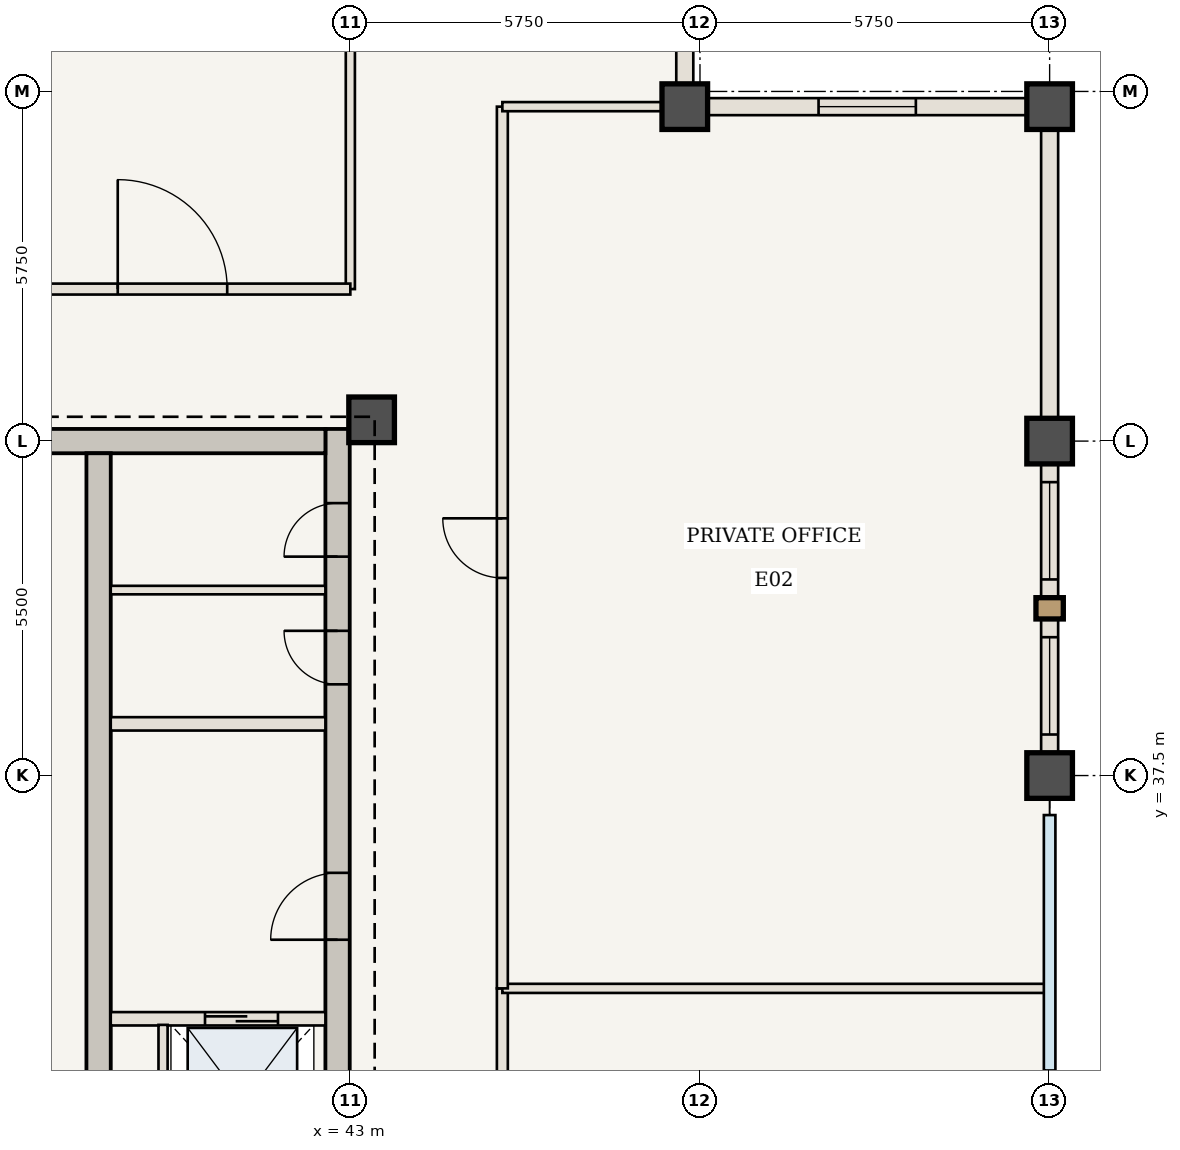
"""IFC4 building model, lengths in metres.
Left out: names, types, materials, properties, quantities, classifications, styles, units other than length and angle.
Written with IfcOpenShell. Run it as: python <this file> out.ifc"""

import sys

from ifc_helpers import new_model, si_unit, direction, frame, frame_2d, origin, origin_2d, place, context, subcontext, project, spatial, rectangle, extrude, element, fill, save


model = new_model("IFC4")
c1 = context("Model", 3, precision=1e-05, world=origin(), true_north=direction((0.0, 1.0)))
c2 = subcontext(c1, "Body", "Model", "MODEL_VIEW")
j1 = project(units=[si_unit("LENGTHUNIT", "METRE"), si_unit("PLANEANGLEUNIT", "RADIAN")], contexts=[c1])
p1 = place(None, origin())
s1 = spatial("IfcSite", under=j1, at=p1, CompositionType="ELEMENT")
p2 = place(p1, origin())
s2 = spatial("IfcBuilding", under=s1, at=p2, CompositionType="ELEMENT")
p3 = place(p2, frame((0.0, 0.0, 308.35)))
s3 = spatial("IfcBuildingStorey", under=s2, at=p3, CompositionType="ELEMENT", Elevation=308.35)
p4 = place(p3, frame((42.79, 30.6, 0.0), z_axis=(0.0, 0.0, 1.0), x_axis=(0.0, 1.0, 0.0)))
e1 = element("IfcWall", 1, at=p4, inside=s3, PredefinedType="SHEAR", context=c2, shape_type="SweptSolid", body=[
    extrude(rectangle(XDim=12.6, YDim=0.4, at=frame_2d((6.3, 0.0))), origin(), (0.0, 0.0, 1.0), 4.9),
])
p5 = place(p4, frame((4.2, 0.0, 0.0)))
e2 = element("IfcOpeningElement", 2, at=p5, cuts=e1, PredefinedType="OPENING", context=c2, shape_type="SweptSolid", body=[
    extrude(rectangle(XDim=1.1, YDim=2.15, at=frame_2d((0.55, 1.075))), frame((0.0, 0.21, 0.0), z_axis=(0.0, -1.0, 0.0), x_axis=(1.0, 0.0, 0.0)), (0.0, 0.0, 1.0), 0.42),
])
p6 = place(p4, frame((8.4, 0.0, 0.0)))
e3 = element("IfcOpeningElement", 3, at=p6, cuts=e1, PredefinedType="OPENING", context=c2, shape_type="SweptSolid", body=[
    extrude(rectangle(XDim=0.88, YDim=2.1, at=frame_2d((0.44, 1.05))), frame((0.0, 0.21, 0.0), z_axis=(0.0, -1.0, 0.0), x_axis=(1.0, 0.0, 0.0)), (0.0, 0.0, 1.0), 0.42),
])
p7 = place(p4, frame((10.5, 0.0, 0.0)))
e4 = element("IfcOpeningElement", 4, at=p7, cuts=e1, PredefinedType="OPENING", context=c2, shape_type="SweptSolid", body=[
    extrude(rectangle(XDim=0.88, YDim=2.1, at=frame_2d((0.44, 1.05))), frame((0.0, 0.21, 0.0), z_axis=(0.0, -1.0, 0.0), x_axis=(1.0, 0.0, 0.0)), (0.0, 0.0, 1.0), 0.42),
])
p8 = place(p3, frame((37.75, 43.0, 0.0), z_axis=(0.0, 0.0, 1.0), x_axis=(1.0, 0.0, 0.0)))
e5 = element("IfcWall", 5, at=p8, inside=s3, PredefinedType="SHEAR", context=c2, shape_type="SweptSolid", body=[
    extrude(rectangle(XDim=4.84, YDim=0.4, at=frame_2d((2.42, 0.0))), origin(), (0.0, 0.0, 1.0), 4.9),
])
p9 = place(p3, frame((38.86, 30.6, 0.0), z_axis=(0.0, 0.0, 1.0), x_axis=(0.0, 1.0, 0.0)))
e6 = element("IfcWall", 6, at=p9, inside=s3, PredefinedType="SHEAR", context=c2, shape_type="SweptSolid", body=[
    extrude(rectangle(XDim=12.2, YDim=0.4, at=frame_2d((6.1, 0.0))), origin(), (0.0, 0.0, 1.0), 4.9),
])
for number, where, z_axis, x_axis in (
    (7, (43.35, 43.35, 0.0), (0.0, 0.0, 1.0), (1.0, 0.0, 0.0)),
    (8, (54.5, 48.5, 0.0), (0.0, 0.0, 1.0), (1.0, 0.0, 0.0)),
    (9, (48.5, 48.5, 0.0), (0.0, 0.0, 1.0), (1.0, 0.0, 0.0)),
    (10, (54.5, 37.5, 0.0), (0.0, 0.0, 1.0), (1.0, 0.0, 0.0)),
    (11, (54.5, 43.0, 0.0), (0.0, 0.0, 1.0), (1.0, 0.0, 0.0)),
):
    element("IfcColumn", number, at=place(p3, frame(where, z_axis=z_axis, x_axis=x_axis)), inside=s3, PredefinedType="COLUMN", context=c2, shape_type="SweptSolid", body=[
        extrude(rectangle(XDim=0.75, YDim=0.75, at=origin_2d()), origin(), (0.0, 0.0, 1.0), 4.9),
    ])
p10 = place(p3, frame((39.06, 33.5, 0.0), z_axis=(0.0, 0.0, 1.0), x_axis=(1.0, 0.0, 0.0)))
e12 = element("IfcWall", 12, at=p10, inside=s3, PredefinedType="STANDARD", context=c2, shape_type="SweptSolid", body=[
    extrude(rectangle(XDim=3.53, YDim=0.22, at=frame_2d((1.765, 0.0))), origin(), (0.0, 0.0, 1.0), 4.64),
])
p11 = place(p10, frame((1.55, 0.0, 0.0)))
e13 = element("IfcOpeningElement", 13, at=p11, cuts=e12, PredefinedType="OPENING", context=c2, shape_type="SweptSolid", body=[
    extrude(rectangle(XDim=1.2, YDim=2.2, at=frame_2d((0.6, 1.1))), frame((0.0, 0.12, 0.0), z_axis=(0.0, -1.0, 0.0), x_axis=(1.0, 0.0, 0.0)), (0.0, 0.0, 1.0), 0.24),
])
p12 = place(p3, frame((39.92, 30.75, 0.0), z_axis=(0.0, 0.0, 1.0), x_axis=(0.0, 1.0, 0.0)))
e14 = element("IfcWall", 14, at=p12, inside=s3, PredefinedType="STANDARD", context=c2, shape_type="SweptSolid", body=[
    extrude(rectangle(XDim=2.65, YDim=0.15, at=frame_2d((1.325, 0.0))), origin(), (0.0, 0.0, 1.0), 4.64),
])
p13 = place(p3, frame((39.06, 38.35, 0.0), z_axis=(0.0, 0.0, 1.0), x_axis=(1.0, 0.0, 0.0)))
e15 = element("IfcWall", 15, at=p13, inside=s3, PredefinedType="STANDARD", context=c2, shape_type="SweptSolid", body=[
    extrude(rectangle(XDim=3.53, YDim=0.22, at=frame_2d((1.765, 0.0))), origin(), (0.0, 0.0, 1.0), 4.64),
])
p14 = place(p3, frame((39.06, 40.55, 0.0), z_axis=(0.0, 0.0, 1.0), x_axis=(1.0, 0.0, 0.0)))
e16 = element("IfcWall", 16, at=p14, inside=s3, PredefinedType="STANDARD", context=c2, shape_type="SweptSolid", body=[
    extrude(rectangle(XDim=3.53, YDim=0.14, at=frame_2d((1.765, 0.0))), origin(), (0.0, 0.0, 1.0), 4.64),
])
p15 = place(p3, frame((43.0, 45.5, 0.0), z_axis=(0.0, 0.0, 1.0), x_axis=(0.0, 1.0, 0.0)))
e17 = element("IfcWall", 17, at=p15, inside=s3, PredefinedType="STANDARD", context=c2, shape_type="SweptSolid", body=[
    extrude(rectangle(XDim=8.94, YDim=0.15, at=frame_2d((4.47, 0.0))), origin(), (0.0, 0.0, 1.0), 4.64),
])
p16 = place(p3, frame((36.4, 45.5, 0.0), z_axis=(0.0, 0.0, 1.0), x_axis=(1.0, 0.0, 0.0)))
e18 = element("IfcWall", 18, at=p16, inside=s3, PredefinedType="STANDARD", context=c2, shape_type="SweptSolid", body=[
    extrude(rectangle(XDim=6.6, YDim=0.18, at=frame_2d((3.3, 0.0))), origin(), (0.0, 0.0, 1.0), 4.64),
])
p17 = place(p16, frame((2.775, 0.0, 0.0)))
e19 = element("IfcOpeningElement", 19, at=p17, cuts=e18, PredefinedType="OPENING", context=c2, shape_type="SweptSolid", body=[
    extrude(rectangle(XDim=1.8, YDim=2.35, at=frame_2d((0.9, 1.175))), frame((0.0, 0.1, 0.0), z_axis=(0.0, -1.0, 0.0), x_axis=(1.0, 0.0, 0.0)), (0.0, 0.0, 1.0), 0.2),
])
p18 = place(p3, frame((45.5, 15.5, 0.0), z_axis=(0.0, 0.0, 1.0), x_axis=(0.0, 1.0, 0.0)))
e20 = element("IfcWall", 20, at=p18, inside=s3, PredefinedType="STANDARD", context=c2, shape_type="SweptSolid", body=[
    extrude(rectangle(XDim=18.5, YDim=0.18, at=frame_2d((9.25, 0.0))), origin(), (0.0, 0.0, 1.0), 4.64),
])
p19 = place(p18, frame((8.75, 0.0, 0.0)))
e21 = element("IfcOpeningElement", 21, at=p19, cuts=e20, PredefinedType="OPENING", context=c2, shape_type="SweptSolid", body=[
    extrude(rectangle(XDim=0.98, YDim=2.2, at=frame_2d((0.49, 1.1))), frame((0.0, 0.1, 0.0), z_axis=(0.0, -1.0, 0.0), x_axis=(1.0, 0.0, 0.0)), (0.0, 0.0, 1.0), 0.2),
])
p20 = place(p3, frame((45.5, 34.0, 0.0), z_axis=(0.0, 0.0, 1.0), x_axis=(1.0, 0.0, 0.0)))
e22 = element("IfcWall", 22, at=p20, inside=s3, PredefinedType="STANDARD", context=c2, shape_type="SweptSolid", body=[
    extrude(rectangle(XDim=8.94, YDim=0.15, at=frame_2d((4.47, 0.0))), origin(), (0.0, 0.0, 1.0), 4.64),
])
p21 = place(p3, frame((45.5, 34.0, 0.0), z_axis=(0.0, 0.0, 1.0), x_axis=(0.0, 1.0, 0.0)))
e23 = element("IfcWall", 23, at=p21, inside=s3, PredefinedType="STANDARD", context=c2, shape_type="SweptSolid", body=[
    extrude(rectangle(XDim=14.5, YDim=0.18, at=frame_2d((7.25, 0.0))), origin(), (0.0, 0.0, 1.0), 4.64),
])
p22 = place(p21, frame((6.75, 0.0, 0.0)))
e24 = element("IfcOpeningElement", 24, at=p22, cuts=e23, PredefinedType="OPENING", context=c2, shape_type="SweptSolid", body=[
    extrude(rectangle(XDim=0.98, YDim=2.2, at=frame_2d((0.49, 1.1))), frame((0.0, 0.1, 0.0), z_axis=(0.0, -1.0, 0.0), x_axis=(1.0, 0.0, 0.0)), (0.0, 0.0, 1.0), 0.2),
])
p23 = place(p3, frame((45.5, 48.5, 0.0), z_axis=(0.0, 0.0, 1.0), x_axis=(1.0, 0.0, 0.0)))
e25 = element("IfcWall", 25, at=p23, inside=s3, PredefinedType="STANDARD", context=c2, shape_type="SweptSolid", body=[
    extrude(rectangle(XDim=3.0, YDim=0.15, at=frame_2d((1.5, 0.0))), origin(), (0.0, 0.0, 1.0), 4.64),
])
p24 = place(p3, frame((54.5, 43.0, 0.0), z_axis=(0.0, 0.0, 1.0), x_axis=(0.0, -1.0, 0.0)))
e26 = element("IfcWall", 26, at=p24, inside=s3, PredefinedType="USERDEFINED", context=c2, shape_type="SweptSolid", body=[
    extrude(rectangle(XDim=5.5, YDim=0.28, at=frame_2d((2.75, 0.0))), origin(), (0.0, 0.0, 1.0), 3.94),
])
p25 = place(p24, frame((0.675, 0.0, 0.85)))
e27 = element("IfcOpeningElement", 27, at=p25, cuts=e26, PredefinedType="OPENING", context=c2, shape_type="SweptSolid", body=[
    extrude(rectangle(XDim=1.6, YDim=2.15, at=frame_2d((0.8, 1.075))), frame((0.0, 0.15, 0.0), z_axis=(0.0, -1.0, 0.0), x_axis=(1.0, 0.0, 0.0)), (0.0, 0.0, 1.0), 0.3),
])
p26 = place(p24, frame((3.225, 0.0, 0.85)))
e28 = element("IfcOpeningElement", 28, at=p26, cuts=e26, PredefinedType="OPENING", context=c2, shape_type="SweptSolid", body=[
    extrude(rectangle(XDim=1.6, YDim=2.15, at=frame_2d((0.8, 1.075))), frame((0.0, 0.15, 0.0), z_axis=(0.0, -1.0, 0.0), x_axis=(1.0, 0.0, 0.0)), (0.0, 0.0, 1.0), 0.3),
])
p27 = place(p3, frame((54.5, 48.5, 0.0), z_axis=(0.0, 0.0, 1.0), x_axis=(0.0, -1.0, 0.0)))
e29 = element("IfcWall", 29, at=p27, inside=s3, PredefinedType="USERDEFINED", context=c2, shape_type="SweptSolid", body=[
    extrude(rectangle(XDim=5.5, YDim=0.28, at=frame_2d((2.75, 0.0))), origin(), (0.0, 0.0, 1.0), 3.94),
])
p28 = place(p3, frame((48.5, 48.5, 0.0), z_axis=(0.0, 0.0, 1.0), x_axis=(1.0, 0.0, 0.0)))
e30 = element("IfcWall", 30, at=p28, inside=s3, PredefinedType="USERDEFINED", context=c2, shape_type="SweptSolid", body=[
    extrude(rectangle(XDim=6.0, YDim=0.28, at=frame_2d((3.0, 0.0))), origin(), (0.0, 0.0, 1.0), 3.94),
])
p29 = place(p28, frame((2.2, 0.0, 0.85)))
e31 = element("IfcOpeningElement", 31, at=p29, cuts=e30, PredefinedType="OPENING", context=c2, shape_type="SweptSolid", body=[
    extrude(rectangle(XDim=1.6, YDim=2.05, at=frame_2d((0.8, 1.025))), frame((0.0, 0.15, 0.0), z_axis=(0.0, -1.0, 0.0), x_axis=(1.0, 0.0, 0.0)), (0.0, 0.0, 1.0), 0.3),
])
p30 = place(p3, frame((48.5, 54.5, 0.0), z_axis=(0.0, 0.0, 1.0), x_axis=(0.0, -1.0, 0.0)))
e32 = element("IfcWall", 32, at=p30, inside=s3, PredefinedType="USERDEFINED", context=c2, shape_type="SweptSolid", body=[
    extrude(rectangle(XDim=6.0, YDim=0.28, at=frame_2d((3.0, 0.0))), origin(), (0.0, 0.0, 1.0), 3.94),
])
p31 = place(p30, frame((2.2, 0.0, 0.85)))
e33 = element("IfcOpeningElement", 33, at=p31, cuts=e32, PredefinedType="OPENING", context=c2, shape_type="SweptSolid", body=[
    extrude(rectangle(XDim=1.6, YDim=2.05, at=frame_2d((0.8, 1.025))), frame((0.0, 0.15, 0.0), z_axis=(0.0, -1.0, 0.0), x_axis=(1.0, 0.0, 0.0)), (0.0, 0.0, 1.0), 0.3),
])
p32 = place(p5, origin())
e34 = element("IfcDoor", 34, at=p32, inside=s3, OperationType="SINGLE_SWING_LEFT", PredefinedType="DOOR", context=c2, shape_type="SweptSolid", body=[
    extrude(rectangle(XDim=1.1, YDim=2.15, at=frame_2d((0.55, 1.075))), frame((0.0, 0.025, 0.0), z_axis=(0.0, -1.0, 0.0), x_axis=(1.0, 0.0, 0.0)), (0.0, 0.0, 1.0), 0.05),
])
fill(e2, e34)
p33 = place(p6, origin())
e35 = element("IfcDoor", 35, at=p33, inside=s3, OperationType="SINGLE_SWING_RIGHT", PredefinedType="DOOR", context=c2, shape_type="SweptSolid", body=[
    extrude(rectangle(XDim=0.88, YDim=2.1, at=frame_2d((0.44, 1.05))), frame((0.0, 0.025, 0.0), z_axis=(0.0, -1.0, 0.0), x_axis=(1.0, 0.0, 0.0)), (0.0, 0.0, 1.0), 0.05),
])
fill(e3, e35)
p34 = place(p7, origin())
e36 = element("IfcDoor", 36, at=p34, inside=s3, OperationType="SINGLE_SWING_LEFT", PredefinedType="DOOR", context=c2, shape_type="SweptSolid", body=[
    extrude(rectangle(XDim=0.88, YDim=2.1, at=frame_2d((0.44, 1.05))), frame((0.0, 0.025, 0.0), z_axis=(0.0, -1.0, 0.0), x_axis=(1.0, 0.0, 0.0)), (0.0, 0.0, 1.0), 0.05),
])
fill(e4, e36)
p35 = place(p11, origin())
e37 = element("IfcDoor", 37, at=p35, inside=s3, OperationType="DOUBLE_DOOR_SLIDING", PredefinedType="DOOR", context=c2, shape_type="SweptSolid", body=[
    extrude(rectangle(XDim=1.2, YDim=2.2, at=frame_2d((0.6, 1.1))), frame((0.0, 0.025, 0.0), z_axis=(0.0, -1.0, 0.0), x_axis=(1.0, 0.0, 0.0)), (0.0, 0.0, 1.0), 0.05),
])
fill(e13, e37)
p36 = place(p17, origin())
e38 = element("IfcDoor", 38, at=p36, inside=s3, OperationType="SINGLE_SWING_LEFT", PredefinedType="DOOR", context=c2, shape_type="SweptSolid", body=[
    extrude(rectangle(XDim=1.8, YDim=2.35, at=frame_2d((0.9, 1.175))), frame((0.0, 0.025, 0.0), z_axis=(0.0, -1.0, 0.0), x_axis=(1.0, 0.0, 0.0)), (0.0, 0.0, 1.0), 0.05),
])
fill(e19, e38)
p37 = place(p22, origin())
e39 = element("IfcDoor", 39, at=p37, inside=s3, OperationType="SINGLE_SWING_RIGHT", PredefinedType="DOOR", context=c2, shape_type="SweptSolid", body=[
    extrude(rectangle(XDim=0.98, YDim=2.2, at=frame_2d((0.49, 1.1))), frame((0.0, 0.025, 0.0), z_axis=(0.0, -1.0, 0.0), x_axis=(1.0, 0.0, 0.0)), (0.0, 0.0, 1.0), 0.05),
])
fill(e24, e39)
p38 = place(p25, origin())
e40 = element("IfcWindow", 40, at=p38, inside=s3, PartitioningType="SINGLE_PANEL", PredefinedType="WINDOW", context=c2, shape_type="SweptSolid", body=[
    extrude(rectangle(XDim=1.6, YDim=2.15, at=frame_2d((0.8, 1.075))), frame((0.0, 0.03, 0.0), z_axis=(0.0, -1.0, 0.0), x_axis=(1.0, 0.0, 0.0)), (0.0, 0.0, 1.0), 0.06),
])
fill(e27, e40)
p39 = place(p26, origin())
e41 = element("IfcWindow", 41, at=p39, inside=s3, PartitioningType="SINGLE_PANEL", PredefinedType="WINDOW", context=c2, shape_type="SweptSolid", body=[
    extrude(rectangle(XDim=1.6, YDim=2.15, at=frame_2d((0.8, 1.075))), frame((0.0, 0.03, 0.0), z_axis=(0.0, -1.0, 0.0), x_axis=(1.0, 0.0, 0.0)), (0.0, 0.0, 1.0), 0.06),
])
fill(e28, e41)
p40 = place(p29, origin())
e42 = element("IfcWindow", 42, at=p40, inside=s3, PartitioningType="SINGLE_PANEL", PredefinedType="WINDOW", context=c2, shape_type="SweptSolid", body=[
    extrude(rectangle(XDim=1.6, YDim=2.05, at=frame_2d((0.8, 1.025))), frame((0.0, 0.03, 0.0), z_axis=(0.0, -1.0, 0.0), x_axis=(1.0, 0.0, 0.0)), (0.0, 0.0, 1.0), 0.06),
])
fill(e31, e42)
save(model, sys.argv[1])
